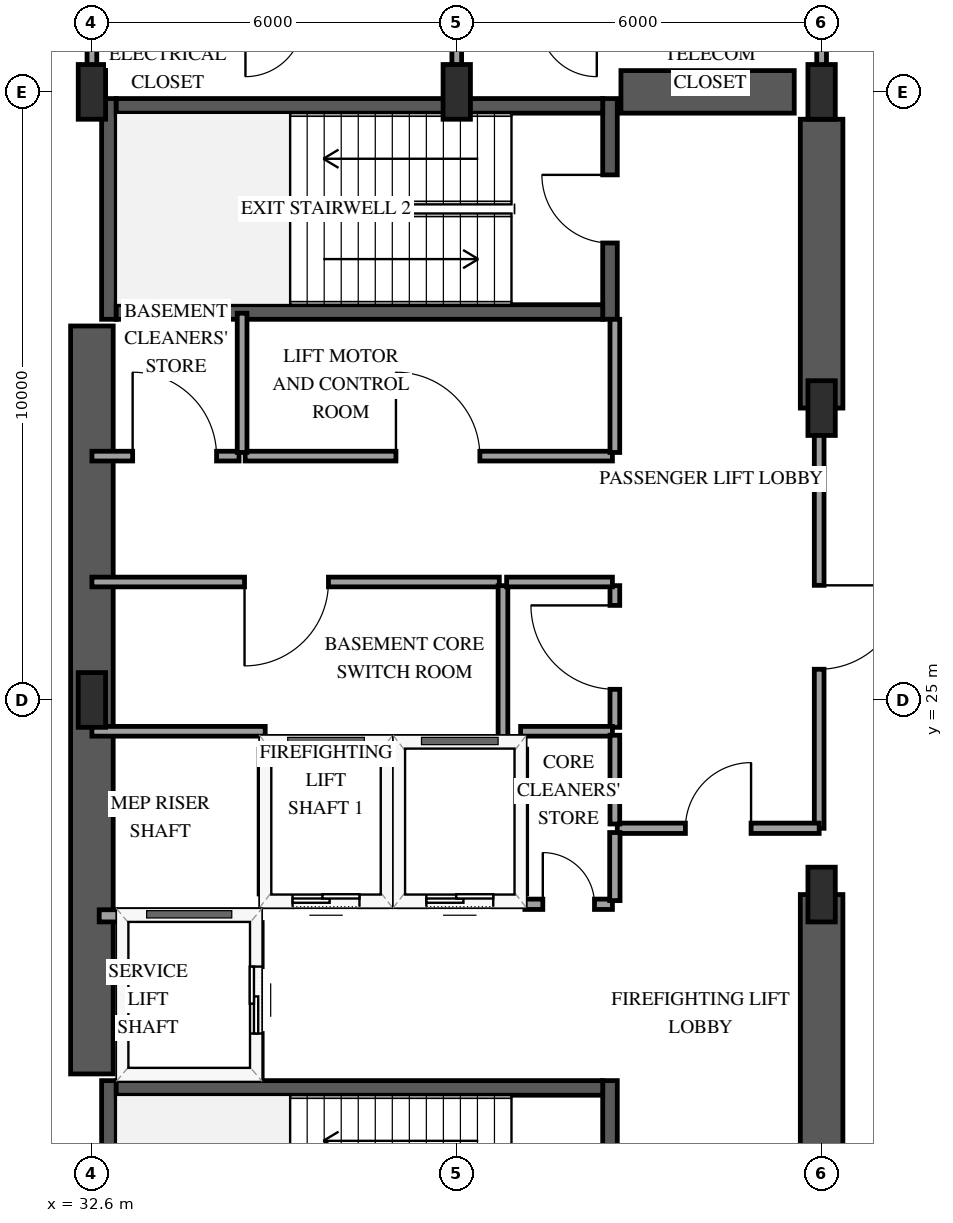
"""IFC4 building model, lengths in metres.
Left out: names, types, materials, properties, quantities, classifications, styles, units other than length and angle.
Written with IfcOpenShell. Run it as: python <this file> out.ifc"""

import sys

from ifc_helpers import new_model, si_unit, direction, frame, frame_2d, origin, origin_2d, place, context, subcontext, project, spatial, rectangle, extrude, element, fill, save


model = new_model("IFC4")
c1 = context("Model", 3, precision=1e-05, world=origin(), true_north=direction((0.0, 1.0)))
c2 = subcontext(c1, "Body", "Model", "MODEL_VIEW")
j1 = project(units=[si_unit("LENGTHUNIT", "METRE"), si_unit("PLANEANGLEUNIT", "RADIAN")], contexts=[c1])
p1 = place(None, origin())
s1 = spatial("IfcSite", under=j1, at=p1, CompositionType="ELEMENT")
p2 = place(p1, origin())
s2 = spatial("IfcBuilding", under=s1, at=p2, CompositionType="ELEMENT")
p3 = place(p2, frame((0.0, 0.0, -10.2)))
s3 = spatial("IfcBuildingStorey", under=s2, at=p3, CompositionType="ELEMENT", Elevation=-10.2)
p4 = place(p3, frame((32.88, 15.11, -0.4), z_axis=(0.0, 0.0, 1.0), x_axis=(0.0, 1.0, 0.0)))
e1 = element("IfcWall", 1, at=p4, inside=s3, PredefinedType="SHEAR", context=c2, shape_type="SweptSolid", body=[
    extrude(rectangle(XDim=3.63, YDim=0.24, at=frame_2d((1.815, 0.0))), origin(), (0.0, 0.0, 1.0), 5.2),
])
p5 = place(p3, frame((41.12, 15.11, -0.4), z_axis=(0.0, 0.0, 1.0), x_axis=(0.0, 1.0, 0.0)))
e2 = element("IfcWall", 2, at=p5, inside=s3, PredefinedType="SHEAR", context=c2, shape_type="SweptSolid", body=[
    extrude(rectangle(XDim=3.63, YDim=0.24, at=frame_2d((1.815, 0.0))), origin(), (0.0, 0.0, 1.0), 5.2),
])
p6 = place(p5, frame((1.255, 0.0, 0.4)))
e3 = element("IfcOpeningElement", 3, at=p6, cuts=e2, PredefinedType="OPENING", context=c2, shape_type="SweptSolid", body=[
    extrude(rectangle(XDim=1.12, YDim=2.15, at=frame_2d((0.56, 1.075))), frame((0.0, 0.13, 0.0), z_axis=(0.0, -1.0, 0.0), x_axis=(1.0, 0.0, 0.0)), (0.0, 0.0, 1.0), 0.26),
])
p7 = place(p3, frame((33.0, 18.62, -0.4), z_axis=(0.0, 0.0, 1.0), x_axis=(1.0, 0.0, 0.0)))
e4 = element("IfcWall", 4, at=p7, inside=s3, PredefinedType="SHEAR", context=c2, shape_type="SweptSolid", body=[
    extrude(rectangle(XDim=8.0, YDim=0.24, at=frame_2d((4.0, 0.0))), origin(), (0.0, 0.0, 1.0), 5.2),
])
p8 = place(p3, frame((32.88, 31.26, -0.4), z_axis=(0.0, 0.0, 1.0), x_axis=(0.0, 1.0, 0.0)))
e5 = element("IfcWall", 5, at=p8, inside=s3, PredefinedType="SHEAR", context=c2, shape_type="SweptSolid", body=[
    extrude(rectangle(XDim=3.63, YDim=0.24, at=frame_2d((1.815, 0.0))), origin(), (0.0, 0.0, 1.0), 5.2),
])
p9 = place(p3, frame((41.12, 31.26, -0.4), z_axis=(0.0, 0.0, 1.0), x_axis=(0.0, 1.0, 0.0)))
e6 = element("IfcWall", 6, at=p9, inside=s3, PredefinedType="SHEAR", context=c2, shape_type="SweptSolid", body=[
    extrude(rectangle(XDim=3.63, YDim=0.24, at=frame_2d((1.815, 0.0))), origin(), (0.0, 0.0, 1.0), 5.2),
])
p10 = place(p9, frame((1.255, 0.0, 0.4)))
e7 = element("IfcOpeningElement", 7, at=p10, cuts=e6, PredefinedType="OPENING", context=c2, shape_type="SweptSolid", body=[
    extrude(rectangle(XDim=1.12, YDim=2.15, at=frame_2d((0.56, 1.075))), frame((0.0, 0.13, 0.0), z_axis=(0.0, -1.0, 0.0), x_axis=(1.0, 0.0, 0.0)), (0.0, 0.0, 1.0), 0.26),
])
for number, where, z_axis, x_axis in (
    (8, (33.0, 31.38, -0.4), (0.0, 0.0, 1.0), (1.0, 0.0, 0.0)),
    (9, (33.0, 34.77, -0.4), (0.0, 0.0, 1.0), (1.0, 0.0, 0.0)),
):
    element("IfcWall", number, at=place(p3, frame(where, z_axis=z_axis, x_axis=x_axis)), inside=s3, PredefinedType="SHEAR", context=c2, shape_type="SweptSolid", body=[
        extrude(rectangle(XDim=8.0, YDim=0.24, at=frame_2d((4.0, 0.0))), origin(), (0.0, 0.0, 1.0), 5.2),
    ])
p11 = place(p3, frame((32.6, 18.85, -0.4), z_axis=(0.0, 0.0, 1.0), x_axis=(0.0, 1.0, 0.0)))
e10 = element("IfcWall", 10, at=p11, inside=s3, PredefinedType="SHEAR", context=c2, shape_type="SweptSolid", body=[
    extrude(rectangle(XDim=12.3, YDim=0.7, at=frame_2d((6.15, 0.0))), origin(), (0.0, 0.0, 1.0), 5.2),
])
p12 = place(p3, frame((41.3, 35.0, -0.4), z_axis=(0.0, 0.0, 1.0), x_axis=(1.0, 0.0, 0.0)))
e11 = element("IfcWall", 11, at=p12, inside=s3, PredefinedType="SHEAR", context=c2, shape_type="SweptSolid", body=[
    extrude(rectangle(XDim=2.85, YDim=0.7, at=frame_2d((1.425, 0.0))), origin(), (0.0, 0.0, 1.0), 5.2),
])
p13 = place(p3, frame((44.6, 15.45, -0.4), z_axis=(0.0, 0.0, 1.0), x_axis=(0.0, 1.0, 0.0)))
e12 = element("IfcWall", 12, at=p13, inside=s3, PredefinedType="SHEAR", context=c2, shape_type="SweptSolid", body=[
    extrude(rectangle(XDim=6.35, YDim=0.7, at=frame_2d((3.175, 0.0))), origin(), (0.0, 0.0, 1.0), 5.2),
])
p14 = place(p3, frame((44.6, 29.8, -0.4), z_axis=(0.0, 0.0, 1.0), x_axis=(0.0, 1.0, 0.0)))
e13 = element("IfcWall", 13, at=p14, inside=s3, PredefinedType="SHEAR", context=c2, shape_type="SweptSolid", body=[
    extrude(rectangle(XDim=4.75, YDim=0.7, at=frame_2d((2.375, 0.0))), origin(), (0.0, 0.0, 1.0), 5.2),
])
for number, where, z_axis, x_axis in (
    (14, (32.6, 25.0, -0.4), (0.0, 0.0, 1.0), (1.0, 0.0, 0.0)),
    (15, (32.6, 35.0, -0.4), (0.0, 0.0, 1.0), (1.0, 0.0, 0.0)),
    (16, (38.6, 35.0, -0.4), (0.0, 0.0, 1.0), (1.0, 0.0, 0.0)),
    (17, (44.6, 21.8, -0.4), (0.0, 0.0, 1.0), (1.0, 0.0, 0.0)),
    (18, (44.6, 29.8, -0.4), (0.0, 0.0, 1.0), (1.0, 0.0, 0.0)),
    (19, (44.6, 35.0, -0.4), (0.0, 0.0, 1.0), (1.0, 0.0, 0.0)),
):
    element("IfcColumn", number, at=place(p3, frame(where, z_axis=z_axis, x_axis=x_axis)), inside=s3, PredefinedType="PILASTER", context=c2, shape_type="SweptSolid", body=[
        extrude(rectangle(XDim=0.45, YDim=0.9, at=origin_2d()), origin(), (0.0, 0.0, 1.0), 5.2),
    ])
p15 = place(p3, frame((35.45, 21.7, 0.0), z_axis=(0.0, 0.0, 1.0), x_axis=(1.0, 0.0, 0.0)))
e20 = element("IfcWall", 20, at=p15, inside=s3, PredefinedType="SOLIDWALL", context=c2, shape_type="SweptSolid", body=[
    extrude(rectangle(XDim=2.0, YDim=0.2, at=frame_2d((1.0, 0.0))), origin(), (0.0, 0.0, 1.0), 4.44),
])
p16 = place(p15, frame((0.45, 0.0, 0.0)))
e21 = element("IfcOpeningElement", 21, at=p16, cuts=e20, PredefinedType="OPENING", context=c2, shape_type="SweptSolid", body=[
    extrude(rectangle(XDim=1.1, YDim=2.15, at=frame_2d((0.55, 1.075))), frame((0.0, 0.11, 0.0), z_axis=(0.0, -1.0, 0.0), x_axis=(1.0, 0.0, 0.0)), (0.0, 0.0, 1.0), 0.22),
])
p17 = place(p3, frame((35.45, 24.3, 0.0), z_axis=(0.0, 0.0, 1.0), x_axis=(1.0, 0.0, 0.0)))
e22 = element("IfcWall", 22, at=p17, inside=s3, PredefinedType="SOLIDWALL", context=c2, shape_type="SweptSolid", body=[
    extrude(rectangle(XDim=2.0, YDim=0.2, at=frame_2d((1.0, 0.0))), origin(), (0.0, 0.0, 1.0), 4.44),
])
for number, where, z_axis, x_axis in (
    (23, (35.45, 21.81, 0.0), (0.0, 0.0, 1.0), (0.0, 1.0, 0.0)),
    (24, (37.45, 21.81, 0.0), (0.0, 0.0, 1.0), (0.0, 1.0, 0.0)),
):
    element("IfcWall", number, at=place(p3, frame(where, z_axis=z_axis, x_axis=x_axis)), inside=s3, PredefinedType="SOLIDWALL", context=c2, shape_type="SweptSolid", body=[
        extrude(rectangle(XDim=2.38, YDim=0.2, at=frame_2d((1.19, 0.0))), origin(), (0.0, 0.0, 1.0), 4.44),
    ])
p18 = place(p3, frame((37.65, 21.7, 0.0), z_axis=(0.0, 0.0, 1.0), x_axis=(1.0, 0.0, 0.0)))
e25 = element("IfcWall", 25, at=p18, inside=s3, PredefinedType="SOLIDWALL", context=c2, shape_type="SweptSolid", body=[
    extrude(rectangle(XDim=2.0, YDim=0.2, at=frame_2d((1.0, 0.0))), origin(), (0.0, 0.0, 1.0), 4.44),
])
p19 = place(p18, frame((0.45, 0.0, 0.0)))
e26 = element("IfcOpeningElement", 26, at=p19, cuts=e25, PredefinedType="OPENING", context=c2, shape_type="SweptSolid", body=[
    extrude(rectangle(XDim=1.1, YDim=2.15, at=frame_2d((0.55, 1.075))), frame((0.0, 0.11, 0.0), z_axis=(0.0, -1.0, 0.0), x_axis=(1.0, 0.0, 0.0)), (0.0, 0.0, 1.0), 0.22),
])
p20 = place(p3, frame((37.65, 24.3, 0.0), z_axis=(0.0, 0.0, 1.0), x_axis=(1.0, 0.0, 0.0)))
e27 = element("IfcWall", 27, at=p20, inside=s3, PredefinedType="SOLIDWALL", context=c2, shape_type="SweptSolid", body=[
    extrude(rectangle(XDim=2.0, YDim=0.2, at=frame_2d((1.0, 0.0))), origin(), (0.0, 0.0, 1.0), 4.44),
])
p21 = place(p3, frame((39.65, 21.81, 0.0), z_axis=(0.0, 0.0, 1.0), x_axis=(0.0, 1.0, 0.0)))
e28 = element("IfcWall", 28, at=p21, inside=s3, PredefinedType="SOLIDWALL", context=c2, shape_type="SweptSolid", body=[
    extrude(rectangle(XDim=2.38, YDim=0.2, at=frame_2d((1.19, 0.0))), origin(), (0.0, 0.0, 1.0), 4.44),
])
p22 = place(p3, frame((32.72, 21.45, 0.0), z_axis=(0.0, 0.0, 1.0), x_axis=(1.0, 0.0, 0.0)))
e29 = element("IfcWall", 29, at=p22, inside=s3, PredefinedType="SOLIDWALL", context=c2, shape_type="SweptSolid", body=[
    extrude(rectangle(XDim=2.58, YDim=0.2, at=frame_2d((1.29, 0.0))), origin(), (0.0, 0.0, 1.0), 4.44),
])
p23 = place(p3, frame((35.3, 18.79, 0.0), z_axis=(0.0, 0.0, 1.0), x_axis=(0.0, 1.0, 0.0)))
e30 = element("IfcWall", 30, at=p23, inside=s3, PredefinedType="SOLIDWALL", context=c2, shape_type="SweptSolid", body=[
    extrude(rectangle(XDim=2.55, YDim=0.2, at=frame_2d((1.275, 0.0))), origin(), (0.0, 0.0, 1.0), 4.44),
])
p24 = place(p23, frame((0.725, 0.0, 0.0)))
e31 = element("IfcOpeningElement", 31, at=p24, cuts=e30, PredefinedType="OPENING", context=c2, shape_type="SweptSolid", body=[
    extrude(rectangle(XDim=1.1, YDim=2.15, at=frame_2d((0.55, 1.075))), frame((0.0, 0.11, 0.0), z_axis=(0.0, -1.0, 0.0), x_axis=(1.0, 0.0, 0.0)), (0.0, 0.0, 1.0), 0.22),
])
p25 = place(p3, frame((44.56, 29.8, 0.0), z_axis=(0.0, 0.0, 1.0), x_axis=(0.0, -1.0, 0.0)))
e32 = element("IfcWall", 32, at=p25, inside=s3, PredefinedType="PARTITIONING", context=c2, shape_type="SweptSolid", body=[
    extrude(rectangle(XDim=6.91, YDim=0.16, at=frame_2d((3.455, 0.0))), origin(), (0.0, 0.0, 1.0), 3.48),
])
p26 = place(p25, frame((2.915, 0.0, 0.0)))
e33 = element("IfcOpeningElement", 33, at=p26, cuts=e32, PredefinedType="OPENING", context=c2, shape_type="SweptSolid", body=[
    extrude(rectangle(XDim=1.38, YDim=2.2, at=frame_2d((0.69, 1.1))), frame((0.0, 0.09, 0.0), z_axis=(0.0, -1.0, 0.0), x_axis=(1.0, 0.0, 0.0)), (0.0, 0.0, 1.0), 0.18),
])
p27 = place(p3, frame((39.3, 26.94, 0.0), z_axis=(0.0, 0.0, 1.0), x_axis=(-1.0, 0.0, 0.0)))
e34 = element("IfcWall", 34, at=p27, inside=s3, PredefinedType="PARTITIONING", context=c2, shape_type="SweptSolid", body=[
    extrude(rectangle(XDim=6.7, YDim=0.16, at=frame_2d((3.35, 0.0))), origin(), (0.0, 0.0, 1.0), 4.44),
])
p28 = place(p27, frame((2.81, 0.0, 0.0)))
e35 = element("IfcOpeningElement", 35, at=p28, cuts=e34, PredefinedType="OPENING", context=c2, shape_type="SweptSolid", body=[
    extrude(rectangle(XDim=1.38, YDim=2.2, at=frame_2d((0.69, 1.1))), frame((0.0, 0.09, 0.0), z_axis=(0.0, -1.0, 0.0), x_axis=(1.0, 0.0, 0.0)), (0.0, 0.0, 1.0), 0.18),
])
p29 = place(p3, frame((35.12, 29.01, 0.0), z_axis=(0.0, 0.0, 1.0), x_axis=(1.0, 0.0, 0.0)))
e36 = element("IfcWall", 36, at=p29, inside=s3, PredefinedType="PARTITIONING", context=c2, shape_type="SweptSolid", body=[
    extrude(rectangle(XDim=6.04, YDim=0.16, at=frame_2d((3.02, 0.0))), origin(), (0.0, 0.0, 1.0), 4.44),
])
p30 = place(p29, frame((2.48, 0.0, 0.0)))
e37 = element("IfcOpeningElement", 37, at=p30, cuts=e36, PredefinedType="OPENING", context=c2, shape_type="SweptSolid", body=[
    extrude(rectangle(XDim=1.38, YDim=2.2, at=frame_2d((0.69, 1.1))), frame((0.0, 0.09, 0.0), z_axis=(0.0, -1.0, 0.0), x_axis=(1.0, 0.0, 0.0)), (0.0, 0.0, 1.0), 0.18),
])
p31 = place(p3, frame((41.24, 22.89, 0.0), z_axis=(0.0, 0.0, 1.0), x_axis=(1.0, 0.0, 0.0)))
e38 = element("IfcWall", 38, at=p31, inside=s3, PredefinedType="PARTITIONING", context=c2, shape_type="SweptSolid", body=[
    extrude(rectangle(XDim=3.32, YDim=0.17, at=frame_2d((1.66, 0.0))), origin(), (0.0, 0.0, 1.0), 4.44),
])
p32 = place(p31, frame((1.12, 0.0, 0.0)))
e39 = element("IfcOpeningElement", 39, at=p32, cuts=e38, PredefinedType="OPENING", context=c2, shape_type="SweptSolid", body=[
    extrude(rectangle(XDim=1.08, YDim=2.15, at=frame_2d((0.54, 1.075))), frame((0.0, 0.095, 0.0), z_axis=(0.0, -1.0, 0.0), x_axis=(1.0, 0.0, 0.0)), (0.0, 0.0, 1.0), 0.19),
])
p33 = place(p3, frame((35.45, 24.485, 0.0), z_axis=(0.0, 0.0, 1.0), x_axis=(-1.0, 0.0, 0.0)))
e40 = element("IfcWall", 40, at=p33, inside=s3, PredefinedType="PARTITIONING", context=c2, shape_type="SweptSolid", body=[
    extrude(rectangle(XDim=2.85, YDim=0.16, at=frame_2d((1.425, 0.0))), origin(), (0.0, 0.0, 1.0), 4.44),
])
p34 = place(p3, frame((39.36, 24.3, 0.0), z_axis=(0.0, 0.0, 1.0), x_axis=(0.0, 1.0, 0.0)))
e41 = element("IfcWall", 41, at=p34, inside=s3, PredefinedType="PARTITIONING", context=c2, shape_type="SweptSolid", body=[
    extrude(rectangle(XDim=2.58, YDim=0.16, at=frame_2d((1.29, 0.0))), origin(), (0.0, 0.0, 1.0), 4.44),
])
p35 = place(p3, frame((32.6, 29.01, 0.0), z_axis=(0.0, 0.0, 1.0), x_axis=(1.0, 0.0, 0.0)))
e42 = element("IfcWall", 42, at=p35, inside=s3, PredefinedType="PARTITIONING", context=c2, shape_type="SweptSolid", body=[
    extrude(rectangle(XDim=2.42, YDim=0.16, at=frame_2d((1.21, 0.0))), origin(), (0.0, 0.0, 1.0), 4.44),
])
p36 = place(p35, frame((0.67, 0.0, 0.0)))
e43 = element("IfcOpeningElement", 43, at=p36, cuts=e42, PredefinedType="OPENING", context=c2, shape_type="SweptSolid", body=[
    extrude(rectangle(XDim=1.38, YDim=2.2, at=frame_2d((0.69, 1.1))), frame((0.0, 0.09, 0.0), z_axis=(0.0, -1.0, 0.0), x_axis=(1.0, 0.0, 0.0)), (0.0, 0.0, 1.0), 0.18),
])
p37 = place(p3, frame((41.2, 24.55, 0.0), z_axis=(0.0, 0.0, 1.0), x_axis=(0.0, 1.0, 0.0)))
e44 = element("IfcWall", 44, at=p37, inside=s3, PredefinedType="PARTITIONING", context=c2, shape_type="SweptSolid", body=[
    extrude(rectangle(XDim=2.33, YDim=0.16, at=frame_2d((1.165, 0.0))), origin(), (0.0, 0.0, 1.0), 4.44),
])
p38 = place(p37, frame((0.625, 0.0, 0.0)))
e45 = element("IfcOpeningElement", 45, at=p38, cuts=e44, PredefinedType="OPENING", context=c2, shape_type="SweptSolid", body=[
    extrude(rectangle(XDim=1.38, YDim=2.2, at=frame_2d((0.69, 1.1))), frame((0.0, 0.09, 0.0), z_axis=(0.0, -1.0, 0.0), x_axis=(1.0, 0.0, 0.0)), (0.0, 0.0, 1.0), 0.18),
])
p39 = place(p3, frame((35.07, 29.07, 0.0), z_axis=(0.0, 0.0, 1.0), x_axis=(0.0, 1.0, 0.0)))
e46 = element("IfcWall", 46, at=p39, inside=s3, PredefinedType="PARTITIONING", context=c2, shape_type="SweptSolid", body=[
    extrude(rectangle(XDim=2.29, YDim=0.16, at=frame_2d((1.145, 0.0))), origin(), (0.0, 0.0, 1.0), 4.44),
])
p40 = place(p3, frame((41.2, 29.07, 0.0), z_axis=(0.0, 0.0, 1.0), x_axis=(0.0, 1.0, 0.0)))
e47 = element("IfcWall", 47, at=p40, inside=s3, PredefinedType="PARTITIONING", context=c2, shape_type="SweptSolid", body=[
    extrude(rectangle(XDim=2.19, YDim=0.16, at=frame_2d((1.095, 0.0))), origin(), (0.0, 0.0, 1.0), 4.44),
])
p41 = place(p3, frame((41.16, 26.94, 0.0), z_axis=(0.0, 0.0, 1.0), x_axis=(-1.0, 0.0, 0.0)))
e48 = element("IfcWall", 48, at=p41, inside=s3, PredefinedType="PARTITIONING", context=c2, shape_type="SweptSolid", body=[
    extrude(rectangle(XDim=1.74, YDim=0.16, at=frame_2d((0.87, 0.0))), origin(), (0.0, 0.0, 1.0), 4.44),
])
p42 = place(p3, frame((39.65, 24.485, 0.0), z_axis=(0.0, 0.0, 1.0), x_axis=(1.0, 0.0, 0.0)))
e49 = element("IfcWall", 49, at=p42, inside=s3, PredefinedType="PARTITIONING", context=c2, shape_type="SweptSolid", body=[
    extrude(rectangle(XDim=1.51, YDim=0.16, at=frame_2d((0.755, 0.0))), origin(), (0.0, 0.0, 1.0), 4.44),
])
p43 = place(p3, frame((41.2, 22.96, 0.0), z_axis=(0.0, 0.0, 1.0), x_axis=(0.0, 1.0, 0.0)))
e50 = element("IfcWall", 50, at=p43, inside=s3, PredefinedType="PARTITIONING", context=c2, shape_type="SweptSolid", body=[
    extrude(rectangle(XDim=1.46, YDim=0.16, at=frame_2d((0.73, 0.0))), origin(), (0.0, 0.0, 1.0), 4.44),
])
p44 = place(p3, frame((39.72, 21.64, 0.0), z_axis=(0.0, 0.0, 1.0), x_axis=(1.0, 0.0, 0.0)))
e51 = element("IfcWall", 51, at=p44, inside=s3, PredefinedType="PARTITIONING", context=c2, shape_type="SweptSolid", body=[
    extrude(rectangle(XDim=1.44, YDim=0.17, at=frame_2d((0.72, 0.0))), origin(), (0.0, 0.0, 1.0), 4.44),
])
p45 = place(p44, frame((0.295, 0.0, 0.0)))
e52 = element("IfcOpeningElement", 52, at=p45, cuts=e51, PredefinedType="OPENING", context=c2, shape_type="SweptSolid", body=[
    extrude(rectangle(XDim=0.85, YDim=2.1, at=frame_2d((0.425, 1.05))), frame((0.0, 0.095, 0.0), z_axis=(0.0, -1.0, 0.0), x_axis=(1.0, 0.0, 0.0)), (0.0, 0.0, 1.0), 0.19),
])
p46 = place(p3, frame((41.2, 21.7, 0.0), z_axis=(0.0, 0.0, 1.0), x_axis=(0.0, 1.0, 0.0)))
e53 = element("IfcWall", 53, at=p46, inside=s3, PredefinedType="PARTITIONING", context=c2, shape_type="SweptSolid", body=[
    extrude(rectangle(XDim=1.12, YDim=0.17, at=frame_2d((0.56, 0.0))), origin(), (0.0, 0.0, 1.0), 4.44),
])
for number, where, z_axis, x_axis in (
    (54, (32.6, 36.13, 0.0), (0.0, 0.0, 1.0), (0.0, -1.0, 0.0)),
    (55, (44.6, 35.07, 0.0), (0.0, 0.0, 1.0), (0.0, 1.0, 0.0)),
):
    element("IfcWall", number, at=place(p3, frame(where, z_axis=z_axis, x_axis=x_axis)), inside=s3, PredefinedType="PARTITIONING", context=c2, shape_type="SweptSolid", body=[
        extrude(rectangle(XDim=1.06, YDim=0.16, at=frame_2d((0.53, 0.0))), origin(), (0.0, 0.0, 1.0), 3.562),
    ])
p47 = place(p3, frame((38.6, 36.13, 0.0), z_axis=(0.0, 0.0, 1.0), x_axis=(0.0, -1.0, 0.0)))
e56 = element("IfcWall", 56, at=p47, inside=s3, PredefinedType="PARTITIONING", context=c2, shape_type="SweptSolid", body=[
    extrude(rectangle(XDim=1.06, YDim=0.16, at=frame_2d((0.53, 0.0))), origin(), (0.0, 0.0, 1.0), 4.44),
])
p48 = place(p16, origin())
e57 = element("IfcDoor", 57, at=p48, inside=s3, OperationType="SLIDING_TO_LEFT", PredefinedType="DOOR", context=c2, shape_type="SweptSolid", body=[
    extrude(rectangle(XDim=1.1, YDim=2.15, at=frame_2d((0.55, 1.075))), frame((0.0, 0.025, 0.0), z_axis=(0.0, -1.0, 0.0), x_axis=(1.0, 0.0, 0.0)), (0.0, 0.0, 1.0), 0.05),
])
fill(e21, e57)
p49 = place(p19, origin())
e58 = element("IfcDoor", 58, at=p49, inside=s3, OperationType="SLIDING_TO_LEFT", PredefinedType="DOOR", context=c2, shape_type="SweptSolid", body=[
    extrude(rectangle(XDim=1.1, YDim=2.15, at=frame_2d((0.55, 1.075))), frame((0.0, 0.025, 0.0), z_axis=(0.0, -1.0, 0.0), x_axis=(1.0, 0.0, 0.0)), (0.0, 0.0, 1.0), 0.05),
])
fill(e26, e58)
p50 = place(p24, origin())
e59 = element("IfcDoor", 59, at=p50, inside=s3, OperationType="SLIDING_TO_LEFT", PredefinedType="DOOR", context=c2, shape_type="SweptSolid", body=[
    extrude(rectangle(XDim=1.1, YDim=2.15, at=frame_2d((0.55, 1.075))), frame((0.0, 0.025, 0.0), z_axis=(0.0, -1.0, 0.0), x_axis=(1.0, 0.0, 0.0)), (0.0, 0.0, 1.0), 0.05),
])
fill(e31, e59)
p51 = place(p10, origin())
e60 = element("IfcDoor", 60, at=p51, inside=s3, OperationType="SINGLE_SWING_RIGHT", PredefinedType="DOOR", context=c2, shape_type="SweptSolid", body=[
    extrude(rectangle(XDim=1.12, YDim=2.15, at=frame_2d((0.56, 1.075))), frame((0.0, 0.025, 0.0), z_axis=(0.0, -1.0, 0.0), x_axis=(1.0, 0.0, 0.0)), (0.0, 0.0, 1.0), 0.05),
])
fill(e7, e60)
p52 = place(p26, origin())
e61 = element("IfcDoor", 61, at=p52, inside=s3, OperationType="SINGLE_SWING_LEFT", PredefinedType="DOOR", context=c2, shape_type="SweptSolid", body=[
    extrude(rectangle(XDim=1.38, YDim=2.2, at=frame_2d((0.69, 1.1))), frame((0.0, 0.025, 0.0), z_axis=(0.0, -1.0, 0.0), x_axis=(1.0, 0.0, 0.0)), (0.0, 0.0, 1.0), 0.05),
])
fill(e33, e61)
p53 = place(p28, origin())
e62 = element("IfcDoor", 62, at=p53, inside=s3, OperationType="SINGLE_SWING_RIGHT", PredefinedType="DOOR", context=c2, shape_type="SweptSolid", body=[
    extrude(rectangle(XDim=1.38, YDim=2.2, at=frame_2d((0.69, 1.1))), frame((0.0, 0.025, 0.0), z_axis=(0.0, -1.0, 0.0), x_axis=(1.0, 0.0, 0.0)), (0.0, 0.0, 1.0), 0.05),
])
fill(e35, e62)
p54 = place(p30, origin())
e63 = element("IfcDoor", 63, at=p54, inside=s3, OperationType="SINGLE_SWING_LEFT", PredefinedType="DOOR", context=c2, shape_type="SweptSolid", body=[
    extrude(rectangle(XDim=1.38, YDim=2.2, at=frame_2d((0.69, 1.1))), frame((0.0, 0.025, 0.0), z_axis=(0.0, -1.0, 0.0), x_axis=(1.0, 0.0, 0.0)), (0.0, 0.0, 1.0), 0.05),
])
fill(e37, e63)
p55 = place(p32, origin())
e64 = element("IfcDoor", 64, at=p55, inside=s3, OperationType="SINGLE_SWING_RIGHT", PredefinedType="DOOR", context=c2, shape_type="SweptSolid", body=[
    extrude(rectangle(XDim=1.08, YDim=2.15, at=frame_2d((0.54, 1.075))), frame((0.0, 0.025, 0.0), z_axis=(0.0, -1.0, 0.0), x_axis=(1.0, 0.0, 0.0)), (0.0, 0.0, 1.0), 0.05),
])
fill(e39, e64)
p56 = place(p36, origin())
e65 = element("IfcDoor", 65, at=p56, inside=s3, OperationType="SINGLE_SWING_LEFT", PredefinedType="DOOR", context=c2, shape_type="SweptSolid", body=[
    extrude(rectangle(XDim=1.38, YDim=2.2, at=frame_2d((0.69, 1.1))), frame((0.0, 0.025, 0.0), z_axis=(0.0, -1.0, 0.0), x_axis=(1.0, 0.0, 0.0)), (0.0, 0.0, 1.0), 0.05),
])
fill(e43, e65)
p57 = place(p38, origin())
e66 = element("IfcDoor", 66, at=p57, inside=s3, OperationType="SINGLE_SWING_RIGHT", PredefinedType="DOOR", context=c2, shape_type="SweptSolid", body=[
    extrude(rectangle(XDim=1.38, YDim=2.2, at=frame_2d((0.69, 1.1))), frame((0.0, 0.025, 0.0), z_axis=(0.0, -1.0, 0.0), x_axis=(1.0, 0.0, 0.0)), (0.0, 0.0, 1.0), 0.05),
])
fill(e45, e66)
p58 = place(p45, origin())
e67 = element("IfcDoor", 67, at=p58, inside=s3, OperationType="SINGLE_SWING_LEFT", PredefinedType="DOOR", context=c2, shape_type="SweptSolid", body=[
    extrude(rectangle(XDim=0.85, YDim=2.1, at=frame_2d((0.425, 1.05))), frame((0.0, 0.025, 0.0), z_axis=(0.0, -1.0, 0.0), x_axis=(1.0, 0.0, 0.0)), (0.0, 0.0, 1.0), 0.05),
])
fill(e52, e67)
save(model, sys.argv[1])
